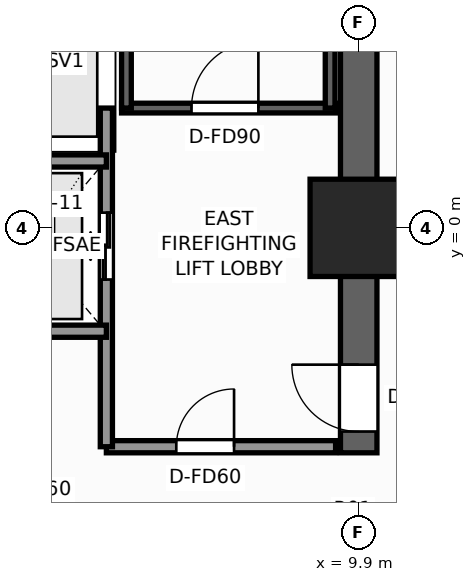
"""IFC4 building model, lengths in metres.
Left out: names, types, materials, properties, quantities, classifications, styles, units other than length and angle.
Written with IfcOpenShell. Run it as: python <this file> out.ifc"""

import sys

from ifc_helpers import new_model, si_unit, direction, frame, frame_2d, origin, origin_2d, place, context, subcontext, project, spatial, rectangle, extrude, element, fill, save


model = new_model("IFC4")
c1 = context("Model", 3, precision=1e-05, world=origin(), true_north=direction((0.0, 1.0)))
c2 = subcontext(c1, "Body", "Model", "MODEL_VIEW")
j1 = project(units=[si_unit("LENGTHUNIT", "METRE"), si_unit("PLANEANGLEUNIT", "RADIAN")], contexts=[c1])
p1 = place(None, origin())
s1 = spatial("IfcSite", under=j1, at=p1, CompositionType="ELEMENT")
p2 = place(p1, origin())
s2 = spatial("IfcBuilding", under=s1, at=p2, CompositionType="ELEMENT")
p3 = place(p2, frame((0.0, 0.0, 5.5)))
s3 = spatial("IfcBuildingStorey", under=s2, at=p3, CompositionType="ELEMENT", Elevation=5.5)
p4 = place(p3, frame((9.9, -3.7, 0.0), z_axis=(0.0, 0.0, 1.0), x_axis=(0.0, 1.0, 0.0)))
e1 = element("IfcWall", 1, at=p4, inside=s3, PredefinedType="SHEAR", context=c2, shape_type="SweptSolid", body=[
    extrude(rectangle(XDim=13.3, YDim=0.6, at=frame_2d((6.65, 0.0))), origin(), (0.0, 0.0, 1.0), 4.5),
])
p5 = place(p4, frame((0.35, 0.0, 0.0)))
e2 = element("IfcOpeningElement", 2, at=p5, cuts=e1, PredefinedType="OPENING", context=c2, shape_type="SweptSolid", body=[
    extrude(rectangle(XDim=1.1, YDim=2.2, at=frame_2d((0.55, 1.1))), frame((0.0, 0.31, 0.0), z_axis=(0.0, -1.0, 0.0), x_axis=(1.0, 0.0, 0.0)), (0.0, 0.0, 1.0), 0.62),
])
p6 = place(p3, frame((9.9, 0.0, 0.0), z_axis=(0.0, 0.0, 1.0), x_axis=(1.0, 0.0, 0.0)))
e3 = element("IfcColumn", 3, at=p6, inside=s3, PredefinedType="COLUMN", context=c2, shape_type="SweptSolid", body=[
    extrude(rectangle(XDim=1.6, YDim=1.6, at=origin_2d()), origin(), (0.0, 0.0, 1.0), 4.5),
])
p7 = place(p3, frame((6.0, 1.97, 0.0), z_axis=(0.0, 0.0, 1.0), x_axis=(1.0, 0.0, 0.0)))
e4 = element("IfcWall", 4, at=p7, inside=s3, PredefinedType="SHEAR", context=c2, shape_type="SweptSolid", body=[
    extrude(rectangle(XDim=3.52, YDim=0.16, at=frame_2d((1.76, 0.0))), origin(), (0.0, 0.0, 1.0), 4.5),
])
p8 = place(p7, frame((1.15, 0.0, 0.0)))
e5 = element("IfcOpeningElement", 5, at=p8, cuts=e4, PredefinedType="OPENING", context=c2, shape_type="SweptSolid", body=[
    extrude(rectangle(XDim=1.1, YDim=2.2, at=frame_2d((0.55, 1.1))), frame((0.0, 0.09, 0.0), z_axis=(0.0, -1.0, 0.0), x_axis=(1.0, 0.0, 0.0)), (0.0, 0.0, 1.0), 0.18),
])
for number, where, z_axis, x_axis in (
    (6, (6.08, 1.97, 0.0), (0.0, 0.0, 1.0), (0.0, 1.0, 0.0)),
    (7, (9.43, 1.97, 0.0), (0.0, 0.0, 1.0), (0.0, 1.0, 0.0)),
):
    element("IfcWall", number, at=place(p3, frame(where, z_axis=z_axis, x_axis=x_axis)), inside=s3, PredefinedType="SHEAR", context=c2, shape_type="SweptSolid", body=[
        extrude(rectangle(XDim=7.56, YDim=0.16, at=frame_2d((3.78, 0.0))), origin(), (0.0, 0.0, 1.0), 4.5),
    ])
p9 = place(p3, frame((5.75, -3.6, 0.0), z_axis=(0.0, 0.0, 1.0), x_axis=(1.0, 0.0, 0.0)))
e8 = element("IfcWall", 8, at=p9, inside=s3, PredefinedType="SOLIDWALL", context=c2, shape_type="SweptSolid", body=[
    extrude(rectangle(XDim=3.77, YDim=0.2, at=frame_2d((1.885, 0.0))), origin(), (0.0, 0.0, 1.0), 4.22),
])
p10 = place(p9, frame((1.15, 0.0, 0.0)))
e9 = element("IfcOpeningElement", 9, at=p10, cuts=e8, PredefinedType="OPENING", context=c2, shape_type="SweptSolid", body=[
    extrude(rectangle(XDim=0.95, YDim=2.06, at=frame_2d((0.475, 1.03))), frame((0.0, 0.11, 0.0), z_axis=(0.0, -1.0, 0.0), x_axis=(1.0, 0.0, 0.0)), (0.0, 0.0, 1.0), 0.22),
])
p11 = place(p3, frame((5.75, -3.6, 0.0), z_axis=(0.0, 0.0, 1.0), x_axis=(0.0, 1.0, 0.0)))
e10 = element("IfcWall", 10, at=p11, inside=s3, PredefinedType="SOLIDWALL", context=c2, shape_type="SweptSolid", body=[
    extrude(rectangle(XDim=5.57, YDim=0.2, at=frame_2d((2.785, 0.0))), origin(), (0.0, 0.0, 1.0), 4.22),
])
p12 = place(p11, frame((2.75, 0.0, 0.0)))
e11 = element("IfcOpeningElement", 11, at=p12, cuts=e10, PredefinedType="OPENING", context=c2, shape_type="SweptSolid", body=[
    extrude(rectangle(XDim=1.1, YDim=2.2, at=frame_2d((0.55, 1.1))), frame((0.0, 0.11, 0.0), z_axis=(0.0, -1.0, 0.0), x_axis=(1.0, 0.0, 0.0)), (0.0, 0.0, 1.0), 0.22),
])
for number, where, z_axis, x_axis in (
    (12, (3.35, -1.7, 0.0), (0.0, 0.0, 1.0), (1.0, 0.0, 0.0)),
    (13, (3.35, 1.1, 0.0), (0.0, 0.0, 1.0), (1.0, 0.0, 0.0)),
):
    element("IfcWall", number, at=place(p3, frame(where, z_axis=z_axis, x_axis=x_axis)), inside=s3, PredefinedType="SOLIDWALL", context=c2, shape_type="SweptSolid", body=[
        extrude(rectangle(XDim=2.4, YDim=0.2, at=frame_2d((1.2, 0.0))), origin(), (0.0, 0.0, 1.0), 4.22),
    ])
p13 = place(p8, origin())
e14 = element("IfcDoor", 14, at=p13, inside=s3, OperationType="SINGLE_SWING_RIGHT", PredefinedType="DOOR", context=c2, shape_type="SweptSolid", body=[
    extrude(rectangle(XDim=1.1, YDim=2.2, at=frame_2d((0.55, 1.1))), frame((0.0, 0.025, 0.0), z_axis=(0.0, -1.0, 0.0), x_axis=(1.0, 0.0, 0.0)), (0.0, 0.0, 1.0), 0.05),
])
fill(e5, e14)
p14 = place(p5, origin())
e15 = element("IfcDoor", 15, at=p14, inside=s3, OperationType="SINGLE_SWING_RIGHT", PredefinedType="DOOR", context=c2, shape_type="SweptSolid", body=[
    extrude(rectangle(XDim=1.1, YDim=2.2, at=frame_2d((0.55, 1.1))), frame((0.0, 0.025, 0.0), z_axis=(0.0, -1.0, 0.0), x_axis=(1.0, 0.0, 0.0)), (0.0, 0.0, 1.0), 0.05),
])
fill(e2, e15)
p15 = place(p12, origin())
e16 = element("IfcDoor", 16, at=p15, inside=s3, OperationType="DOUBLE_DOOR_SLIDING", PredefinedType="DOOR", context=c2, shape_type="SweptSolid", body=[
    extrude(rectangle(XDim=1.1, YDim=2.2, at=frame_2d((0.55, 1.1))), frame((0.0, 0.025, 0.0), z_axis=(0.0, -1.0, 0.0), x_axis=(1.0, 0.0, 0.0)), (0.0, 0.0, 1.0), 0.05),
])
fill(e11, e16)
p16 = place(p10, origin())
e17 = element("IfcDoor", 17, at=p16, inside=s3, OperationType="SINGLE_SWING_RIGHT", PredefinedType="DOOR", context=c2, shape_type="SweptSolid", body=[
    extrude(rectangle(XDim=0.95, YDim=2.06, at=frame_2d((0.475, 1.03))), frame((0.0, 0.025, 0.0), z_axis=(0.0, -1.0, 0.0), x_axis=(1.0, 0.0, 0.0)), (0.0, 0.0, 1.0), 0.05),
])
fill(e9, e17)
save(model, sys.argv[1])
